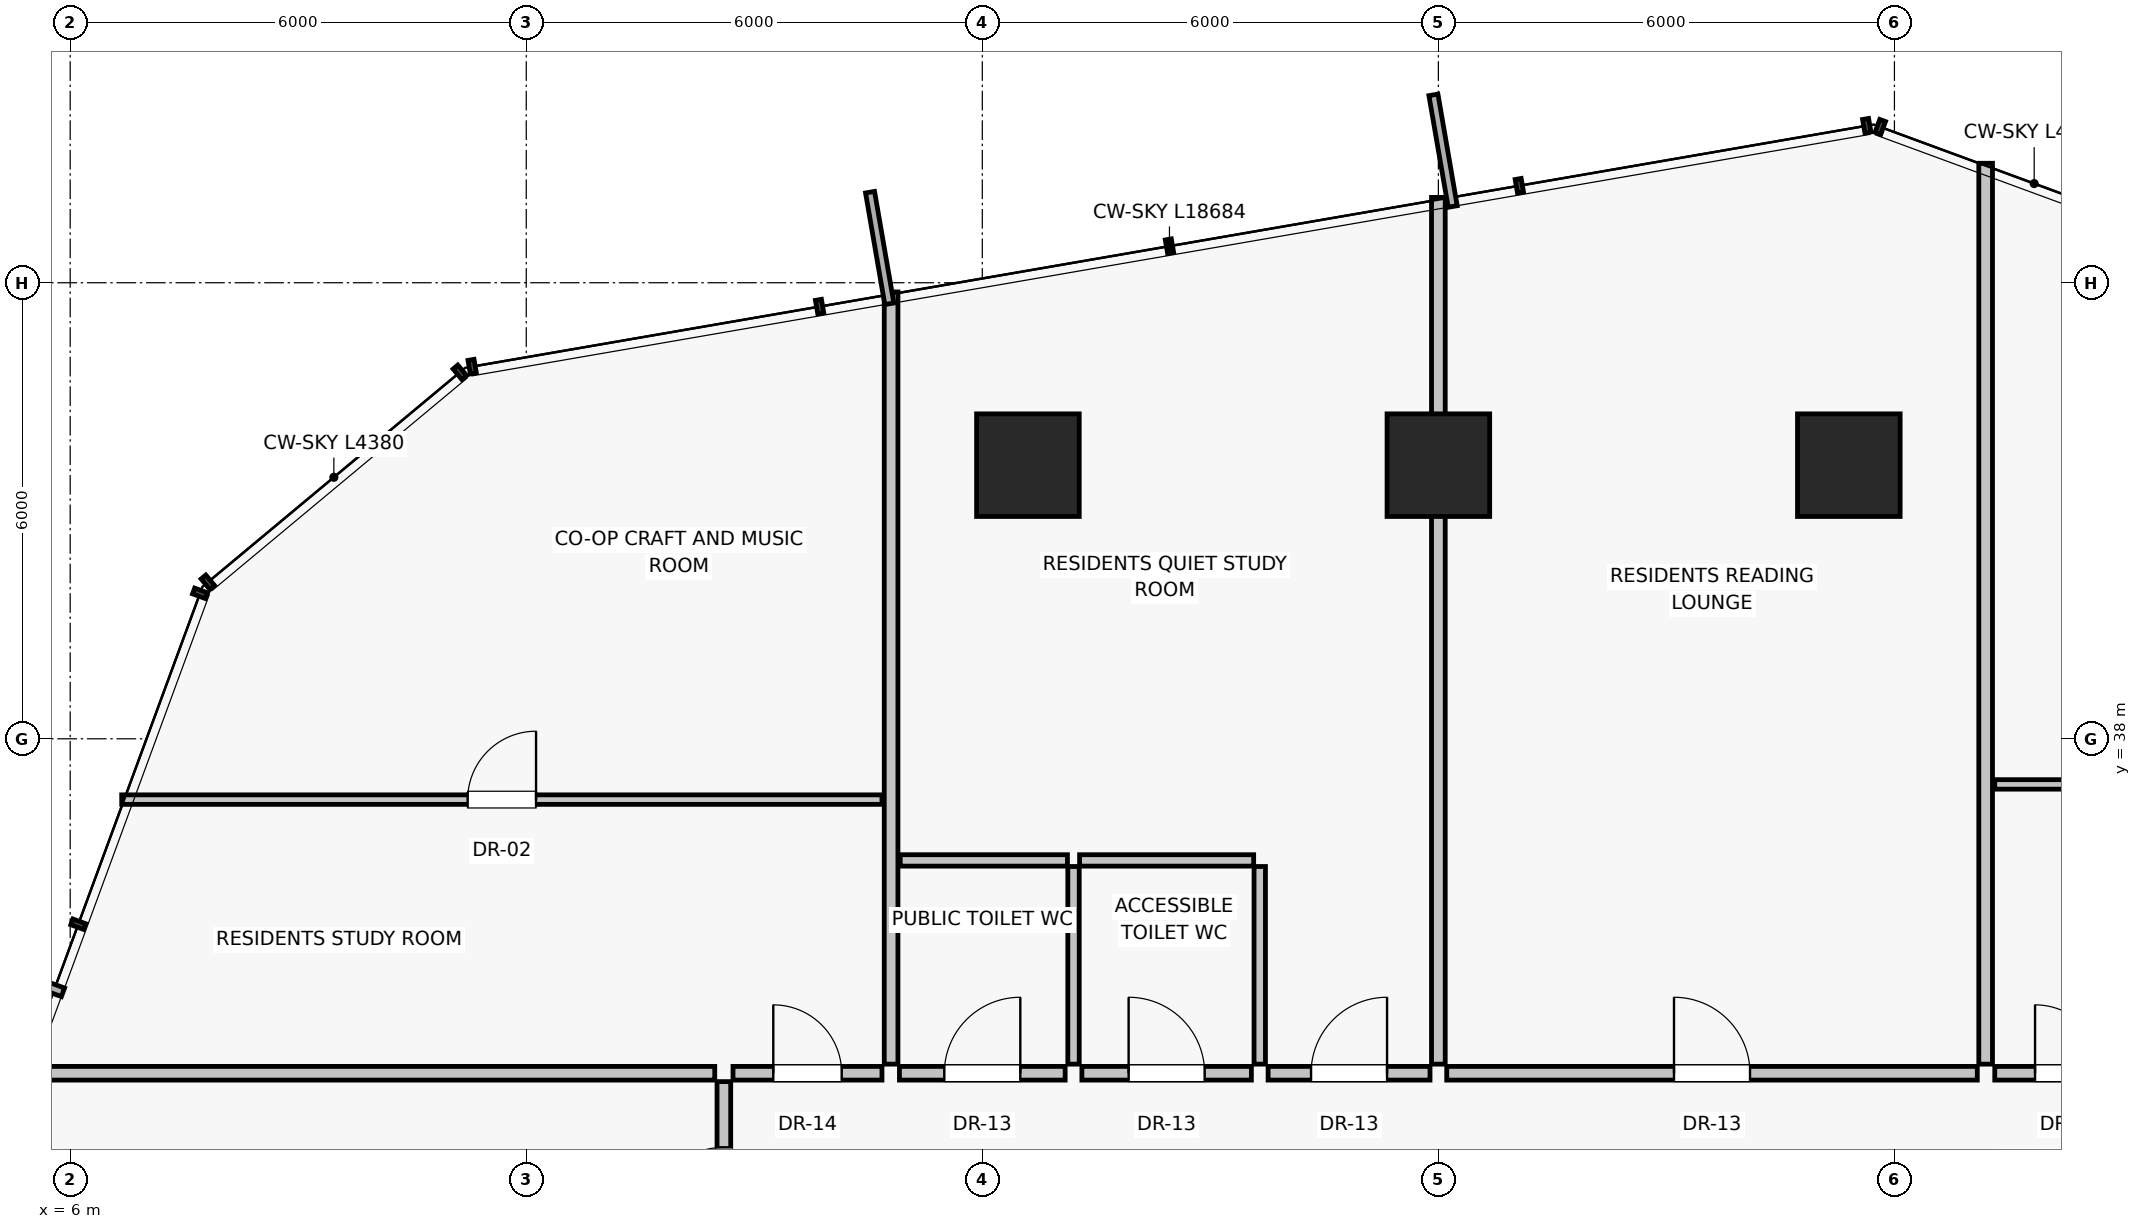
"""IFC4 building model, lengths in metres.
Left out: names, types, materials, properties, quantities, classifications, styles, units other than length and angle.
Written with IfcOpenShell. Run it as: python <this file> out.ifc"""

import sys

from ifc_helpers import new_model, si_unit, direction, frame, frame_2d, origin, origin_2d, place, context, subcontext, project, spatial, rectangle, extrude, source, transform, mapped, element, fill, save


model = new_model("IFC4")
c1 = context("Model", 3, precision=1e-05, world=origin(), true_north=direction((0.0, 1.0)))
c2 = subcontext(c1, "Body", "Model", "MODEL_VIEW")
j1 = project(units=[si_unit("LENGTHUNIT", "METRE"), si_unit("PLANEANGLEUNIT", "RADIAN")], contexts=[c1])
p1 = place(None, origin())
s1 = spatial("IfcSite", under=j1, at=p1, CompositionType="ELEMENT")
p2 = place(p1, origin())
s2 = spatial("IfcBuilding", under=s1, at=p2, CompositionType="ELEMENT")
p3 = place(p2, frame((0.0, 0.0, 56.55)))
s3 = spatial("IfcBuildingStorey", under=s2, at=p3, CompositionType="ELEMENT", Elevation=56.55)
for number, where, z_axis, x_axis in (
    (1, (29.4, 41.6, 0.0), (0.0, 0.0, 1.0), (1.0, 0.0, 0.0)),
    (2, (24.0, 41.6, 0.0), (0.0, 0.0, 1.0), (1.0, 0.0, 0.0)),
    (3, (18.6, 41.6, 0.0), (0.0, 0.0, 1.0), (1.0, 0.0, 0.0)),
):
    element("IfcColumn", number, at=place(p3, frame(where, z_axis=z_axis, x_axis=x_axis)), inside=s3, PredefinedType="COLUMN", context=c2, shape_type="SweptSolid", body=[
        extrude(rectangle(XDim=1.35, YDim=1.35, at=origin_2d()), origin(), (0.0, 0.0, 1.0), 4.3),
    ])
p4 = place(p3, frame((16.8, 33.72, 0.0), z_axis=(0.0, 0.0, 1.0), x_axis=(0.0, 1.0, 0.0)))
e4 = element("IfcWall", 4, at=p4, inside=s3, PredefinedType="PARTITIONING", context=c2, shape_type="SweptSolid", body=[
    extrude(rectangle(XDim=10.159, YDim=0.18, at=frame_2d((5.08, 0.0))), origin(), (0.0, 0.0, 1.0), 4.05),
])
p5 = place(p3, frame((31.2, 33.72, 0.0), z_axis=(0.0, 0.0, 1.0), x_axis=(0.0, 1.0, 0.0)))
e5 = element("IfcWall", 5, at=p5, inside=s3, PredefinedType="PARTITIONING", context=c2, shape_type="SweptSolid", body=[
    extrude(rectangle(XDim=11.852, YDim=0.18, at=frame_2d((5.926, 0.0))), origin(), (0.0, 0.0, 1.0), 4.05),
])
p6 = place(p3, frame((16.91, 33.6, 0.0), z_axis=(0.0, 0.0, 1.0), x_axis=(1.0, 0.0, 0.0)))
e6 = element("IfcWall", 6, at=p6, inside=s3, PredefinedType="PARTITIONING", context=c2, shape_type="SweptSolid", body=[
    extrude(rectangle(XDim=2.18, YDim=0.18, at=frame_2d((1.09, 0.0))), origin(), (0.0, 0.0, 1.0), 4.05),
])
p7 = place(p6, frame((0.59, 0.0, 0.0)))
e7 = element("IfcOpeningElement", 7, at=p7, cuts=e6, PredefinedType="OPENING", context=c2, shape_type="SweptSolid", body=[
    extrude(rectangle(XDim=1.0, YDim=2.01, at=frame_2d((0.5, 1.005))), frame((0.0, 0.1, 0.0), z_axis=(0.0, -1.0, 0.0), x_axis=(1.0, 0.0, 0.0)), (0.0, 0.0, 1.0), 0.2),
])
p8 = place(p3, frame((19.31, 33.6, 0.0), z_axis=(0.0, 0.0, 1.0), x_axis=(1.0, 0.0, 0.0)))
e8 = element("IfcWall", 8, at=p8, inside=s3, PredefinedType="PARTITIONING", context=c2, shape_type="SweptSolid", body=[
    extrude(rectangle(XDim=2.23, YDim=0.18, at=frame_2d((1.115, 0.0))), origin(), (0.0, 0.0, 1.0), 4.05),
])
p9 = place(p8, frame((0.615, 0.0, 0.0)))
e9 = element("IfcOpeningElement", 9, at=p9, cuts=e8, PredefinedType="OPENING", context=c2, shape_type="SweptSolid", body=[
    extrude(rectangle(XDim=1.0, YDim=2.01, at=frame_2d((0.5, 1.005))), frame((0.0, 0.1, 0.0), z_axis=(0.0, -1.0, 0.0), x_axis=(1.0, 0.0, 0.0)), (0.0, 0.0, 1.0), 0.2),
])
p10 = place(p3, frame((21.76, 33.6, 0.0), z_axis=(0.0, 0.0, 1.0), x_axis=(1.0, 0.0, 0.0)))
e10 = element("IfcWall", 10, at=p10, inside=s3, PredefinedType="PARTITIONING", context=c2, shape_type="SweptSolid", body=[
    extrude(rectangle(XDim=2.13, YDim=0.18, at=frame_2d((1.065, 0.0))), origin(), (0.0, 0.0, 1.0), 4.05),
])
p11 = place(p10, frame((0.565, 0.0, 0.0)))
e11 = element("IfcOpeningElement", 11, at=p11, cuts=e10, PredefinedType="OPENING", context=c2, shape_type="SweptSolid", body=[
    extrude(rectangle(XDim=1.0, YDim=2.01, at=frame_2d((0.5, 1.005))), frame((0.0, 0.1, 0.0), z_axis=(0.0, -1.0, 0.0), x_axis=(1.0, 0.0, 0.0)), (0.0, 0.0, 1.0), 0.2),
])
p12 = place(p3, frame((24.11, 33.6, 0.0), z_axis=(0.0, 0.0, 1.0), x_axis=(1.0, 0.0, 0.0)))
e12 = element("IfcWall", 12, at=p12, inside=s3, PredefinedType="PARTITIONING", context=c2, shape_type="SweptSolid", body=[
    extrude(rectangle(XDim=6.98, YDim=0.18, at=frame_2d((3.49, 0.0))), origin(), (0.0, 0.0, 1.0), 4.05),
])
p13 = place(p12, frame((2.99, 0.0, 0.0)))
e13 = element("IfcOpeningElement", 13, at=p13, cuts=e12, PredefinedType="OPENING", context=c2, shape_type="SweptSolid", body=[
    extrude(rectangle(XDim=1.0, YDim=2.01, at=frame_2d((0.5, 1.005))), frame((0.0, 0.1, 0.0), z_axis=(0.0, -1.0, 0.0), x_axis=(1.0, 0.0, 0.0)), (0.0, 0.0, 1.0), 0.2),
])
for number, where, z_axis, x_axis in (
    (14, (19.2, 33.72, 0.0), (0.0, 0.0, 1.0), (0.0, 1.0, 0.0)),
    (15, (21.65, 33.72, 0.0), (0.0, 0.0, 1.0), (0.0, 1.0, 0.0)),
):
    element("IfcWall", number, at=place(p3, frame(where, z_axis=z_axis, x_axis=x_axis)), inside=s3, PredefinedType="PARTITIONING", context=c2, shape_type="SweptSolid", body=[
        extrude(rectangle(XDim=2.6, YDim=0.15, at=frame_2d((1.3, 0.0))), origin(), (0.0, 0.0, 1.0), 4.05),
    ])
p14 = place(p3, frame((16.92, 36.4, 0.0), z_axis=(0.0, 0.0, 1.0), x_axis=(1.0, 0.0, 0.0)))
e16 = element("IfcWall", 16, at=p14, inside=s3, PredefinedType="PARTITIONING", context=c2, shape_type="SweptSolid", body=[
    extrude(rectangle(XDim=2.2, YDim=0.15, at=frame_2d((1.1, 0.0))), origin(), (0.0, 0.0, 1.0), 3.63),
])
p15 = place(p3, frame((19.28, 36.4, 0.0), z_axis=(0.0, 0.0, 1.0), x_axis=(1.0, 0.0, 0.0)))
e17 = element("IfcWall", 17, at=p15, inside=s3, PredefinedType="PARTITIONING", context=c2, shape_type="SweptSolid", body=[
    extrude(rectangle(XDim=2.29, YDim=0.15, at=frame_2d((1.145, 0.0))), origin(), (0.0, 0.0, 1.0), 3.63),
])
p16 = place(p3, frame((24.0, 33.72, 0.0), z_axis=(0.0, 0.0, 1.0), x_axis=(0.0, 1.0, 0.0)))
e18 = element("IfcWall", 18, at=p16, inside=s3, PredefinedType="PARTITIONING", context=c2, shape_type="SweptSolid", body=[
    extrude(rectangle(XDim=11.403, YDim=0.18, at=frame_2d((5.701, 0.0))), origin(), (0.0, 0.0, 1.0), 4.05),
])
p17 = place(p3, frame((14.48, 33.6, 0.0), z_axis=(0.0, 0.0, 1.0), x_axis=(-1.0, 0.0, 0.0)))
e19 = element("IfcWall", 19, at=p17, inside=s3, PredefinedType="PARTITIONING", context=c2, shape_type="SweptSolid", body=[
    extrude(rectangle(XDim=9.126, YDim=0.18, at=frame_2d((4.563, 0.0))), origin(), (0.0, 0.0, 1.0), 4.05),
])
p18 = place(p3, frame((14.6, 30.76, 0.0), z_axis=(0.0, 0.0, 1.0), x_axis=(0.0, 1.0, 0.0)))
e20 = element("IfcWall", 20, at=p18, inside=s3, PredefinedType="PARTITIONING", context=c2, shape_type="SweptSolid", body=[
    extrude(rectangle(XDim=2.73, YDim=0.18, at=frame_2d((1.365, 0.0))), origin(), (0.0, 0.0, 1.0), 4.05),
])
p19 = place(p18, frame((0.865, 0.0, 0.0)))
e21 = element("IfcOpeningElement", 21, at=p19, cuts=e20, PredefinedType="OPENING", context=c2, shape_type="SweptSolid", body=[
    extrude(rectangle(XDim=1.0, YDim=2.01, at=frame_2d((0.5, 1.005))), frame((0.0, 0.1, 0.0), z_axis=(0.0, -1.0, 0.0), x_axis=(1.0, 0.0, 0.0)), (0.0, 0.0, 1.0), 0.2),
])
p20 = place(p3, frame((14.72, 33.6, 0.0), z_axis=(0.0, 0.0, 1.0), x_axis=(1.0, 0.0, 0.0)))
e22 = element("IfcWall", 22, at=p20, inside=s3, PredefinedType="PARTITIONING", context=c2, shape_type="SweptSolid", body=[
    extrude(rectangle(XDim=1.96, YDim=0.18, at=frame_2d((0.98, 0.0))), origin(), (0.0, 0.0, 1.0), 4.05),
])
p21 = place(p20, frame((0.53, 0.0, 0.0)))
e23 = element("IfcOpeningElement", 23, at=p21, cuts=e22, PredefinedType="OPENING", context=c2, shape_type="SweptSolid", body=[
    extrude(rectangle(XDim=0.9, YDim=2.01, at=frame_2d((0.45, 1.005))), frame((0.0, 0.1, 0.0), z_axis=(0.0, -1.0, 0.0), x_axis=(1.0, 0.0, 0.0)), (0.0, 0.0, 1.0), 0.2),
])
p22 = place(p3, frame((6.678, 37.2, 0.0), z_axis=(0.0, 0.0, 1.0), x_axis=(1.0, 0.0, 0.0)))
e24 = element("IfcWall", 24, at=p22, inside=s3, PredefinedType="PARTITIONING", context=c2, shape_type="SweptSolid", body=[
    extrude(rectangle(XDim=10.002, YDim=0.125, at=frame_2d((5.001, 0.0))), origin(), (0.0, 0.0, 1.0), 4.05),
])
p23 = place(p22, frame((4.551, 0.0, 0.0)))
e25 = element("IfcOpeningElement", 25, at=p23, cuts=e24, PredefinedType="OPENING", context=c2, shape_type="SweptSolid", body=[
    extrude(rectangle(XDim=0.9, YDim=2.01, at=frame_2d((0.45, 1.005))), frame((0.0, 0.073, 0.0), z_axis=(0.0, -1.0, 0.0), x_axis=(1.0, 0.0, 0.0)), (0.0, 0.0, 1.0), 0.145),
])
p24 = place(p3, frame((31.32, 33.6, 0.0), z_axis=(0.0, 0.0, 1.0), x_axis=(1.0, 0.0, 0.0)))
e26 = element("IfcWall", 26, at=p24, inside=s3, PredefinedType="PARTITIONING", context=c2, shape_type="SweptSolid", body=[
    extrude(rectangle(XDim=1.96, YDim=0.18, at=frame_2d((0.98, 0.0))), origin(), (0.0, 0.0, 1.0), 4.05),
])
p25 = place(p24, frame((0.53, 0.0, 0.0)))
e27 = element("IfcOpeningElement", 27, at=p25, cuts=e26, PredefinedType="OPENING", context=c2, shape_type="SweptSolid", body=[
    extrude(rectangle(XDim=0.9, YDim=2.01, at=frame_2d((0.45, 1.005))), frame((0.0, 0.1, 0.0), z_axis=(0.0, -1.0, 0.0), x_axis=(1.0, 0.0, 0.0)), (0.0, 0.0, 1.0), 0.2),
])
p26 = place(p3, frame((31.32, 37.4, 0.0), z_axis=(0.0, 0.0, 1.0), x_axis=(1.0, 0.0, 0.0)))
e28 = element("IfcWall", 28, at=p26, inside=s3, PredefinedType="PARTITIONING", context=c2, shape_type="SweptSolid", body=[
    extrude(rectangle(XDim=8.608, YDim=0.125, at=frame_2d((4.304, 0.0))), origin(), (0.0, 0.0, 1.0), 4.05),
])
p27 = place(p26, frame((3.874, 0.0, 0.0)))
e29 = element("IfcOpeningElement", 29, at=p27, cuts=e28, PredefinedType="OPENING", context=c2, shape_type="SweptSolid", body=[
    extrude(rectangle(XDim=0.86, YDim=2.01, at=frame_2d((0.43, 1.005))), frame((0.0, 0.073, 0.0), z_axis=(0.0, -1.0, 0.0), x_axis=(1.0, 0.0, 0.0)), (0.0, 0.0, 1.0), 0.145),
])
m1 = source(origin(), c2, "Body", "SweptSolid", [
    extrude(rectangle(XDim=1.0, YDim=2.01, at=frame_2d((0.5, 1.005))), frame((0.0, 0.025, 0.0), z_axis=(0.0, -1.0, 0.0), x_axis=(1.0, 0.0, 0.0)), (0.0, 0.0, 1.0), 0.05),
])
p28 = place(p7, origin())
e30 = element("IfcDoor", 30, at=p28, inside=s3, OperationType="SINGLE_SWING_RIGHT", PredefinedType="DOOR", context=c2, shape_type="MappedRepresentation", body=[
    mapped(m1, transform((0.0, 0.0, 0.0), scale=1.0)),
])
fill(e7, e30)
p29 = place(p9, origin())
e31 = element("IfcDoor", 31, at=p29, inside=s3, OperationType="SINGLE_SWING_LEFT", PredefinedType="DOOR", context=c2, shape_type="MappedRepresentation", body=[
    mapped(m1, transform((0.0, 0.0, 0.0), scale=1.0)),
])
fill(e9, e31)
p30 = place(p11, origin())
e32 = element("IfcDoor", 32, at=p30, inside=s3, OperationType="SINGLE_SWING_RIGHT", PredefinedType="DOOR", context=c2, shape_type="MappedRepresentation", body=[
    mapped(m1, transform((0.0, 0.0, 0.0), scale=1.0)),
])
fill(e11, e32)
p31 = place(p13, origin())
e33 = element("IfcDoor", 33, at=p31, inside=s3, OperationType="SINGLE_SWING_LEFT", PredefinedType="DOOR", context=c2, shape_type="MappedRepresentation", body=[
    mapped(m1, transform((0.0, 0.0, 0.0), scale=1.0)),
])
fill(e13, e33)
p32 = place(p19, origin())
e34 = element("IfcDoor", 34, at=p32, inside=s3, OperationType="SINGLE_SWING_LEFT", PredefinedType="DOOR", context=c2, shape_type="MappedRepresentation", body=[
    mapped(m1, transform((0.0, 0.0, 0.0), scale=1.0)),
])
fill(e21, e34)
m2 = source(origin(), c2, "Body", "SweptSolid", [
    extrude(rectangle(XDim=0.9, YDim=2.01, at=frame_2d((0.45, 1.005))), frame((0.0, 0.025, 0.0), z_axis=(0.0, -1.0, 0.0), x_axis=(1.0, 0.0, 0.0)), (0.0, 0.0, 1.0), 0.05),
])
p33 = place(p21, origin())
e35 = element("IfcDoor", 35, at=p33, inside=s3, OperationType="SINGLE_SWING_LEFT", PredefinedType="DOOR", context=c2, shape_type="MappedRepresentation", body=[
    mapped(m2, transform((0.0, 0.0, 0.0), scale=1.0)),
])
fill(e23, e35)
p34 = place(p23, origin())
e36 = element("IfcDoor", 36, at=p34, inside=s3, OperationType="SINGLE_SWING_RIGHT", PredefinedType="DOOR", context=c2, shape_type="MappedRepresentation", body=[
    mapped(m2, transform((0.0, 0.0, 0.0), scale=1.0)),
])
fill(e25, e36)
p35 = place(p25, origin())
e37 = element("IfcDoor", 37, at=p35, inside=s3, OperationType="SINGLE_SWING_LEFT", PredefinedType="DOOR", context=c2, shape_type="MappedRepresentation", body=[
    mapped(m2, transform((0.0, 0.0, 0.0), scale=1.0)),
])
fill(e27, e37)
save(model, sys.argv[1])
